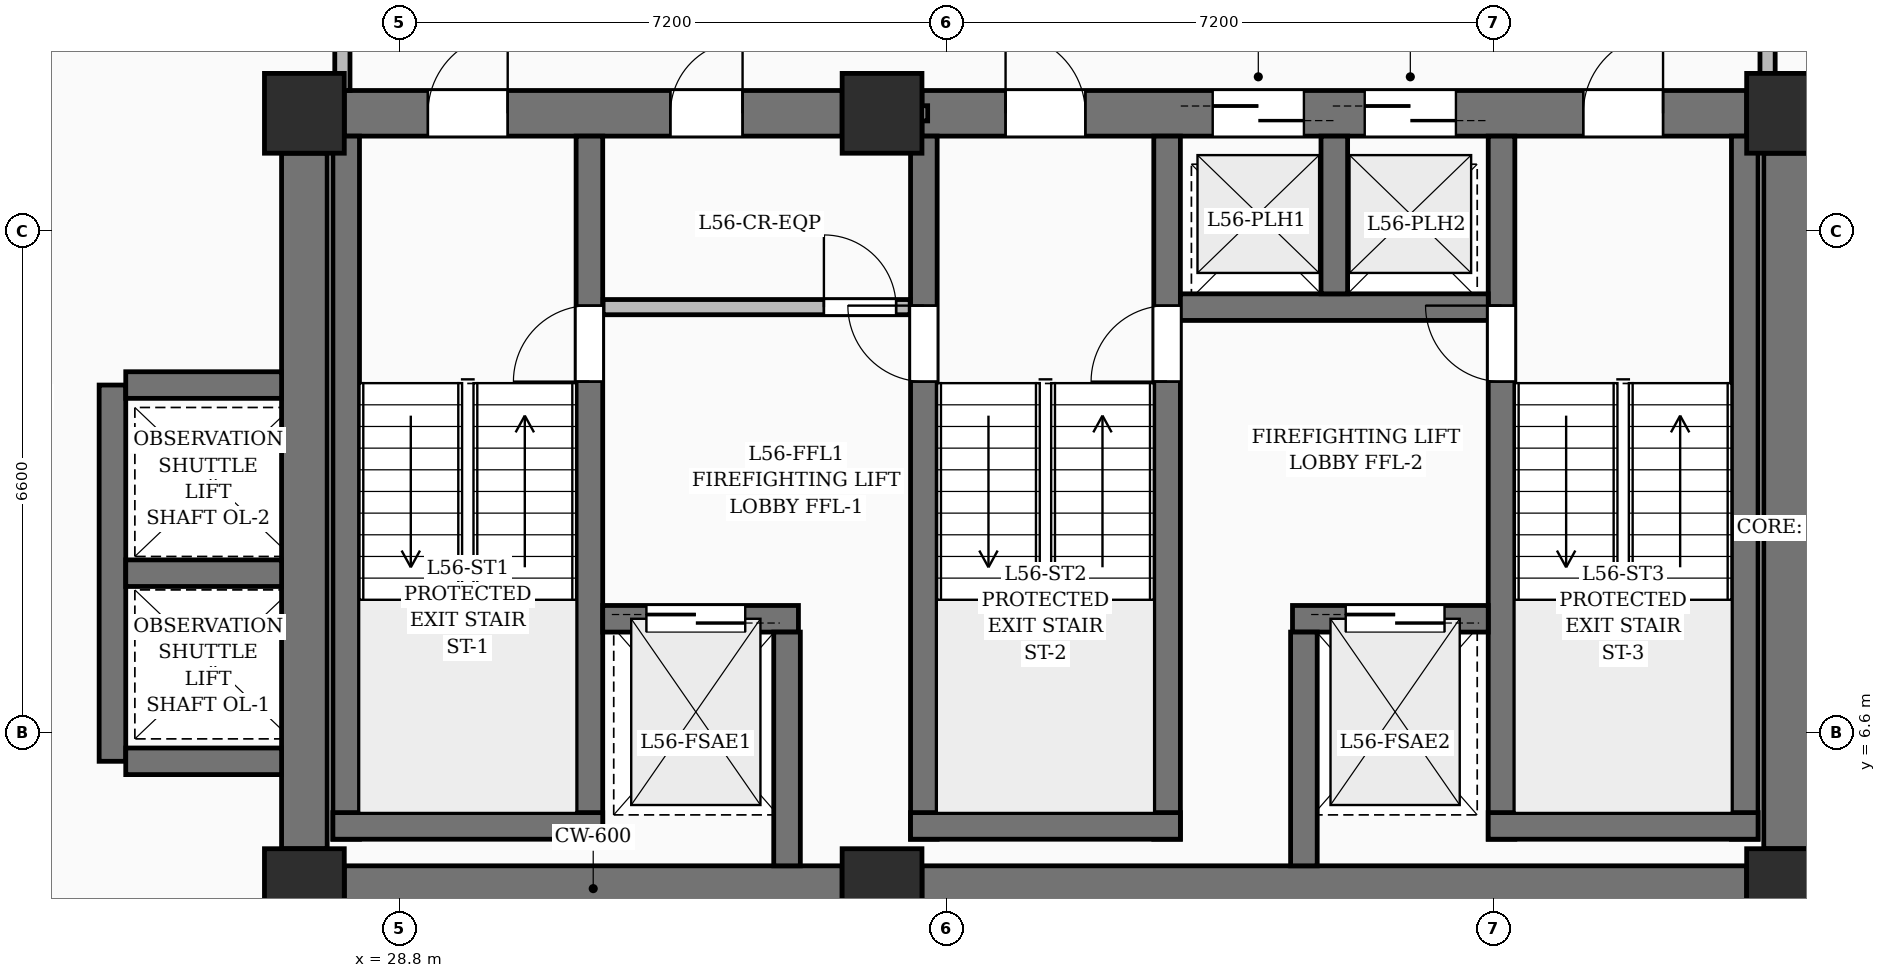
"""IFC4 building model, lengths in metres.
Left out: names, types, materials, properties, quantities, classifications, styles, units other than length and angle.
Written with IfcOpenShell. Run it as: python <this file> out.ifc"""

import sys

from ifc_helpers import new_model, si_unit, direction, frame, frame_2d, origin, origin_2d, place, context, subcontext, project, spatial, rectangle, extrude, element, fill, save


model = new_model("IFC4")
c1 = context("Model", 3, precision=1e-05, world=origin(), true_north=direction((0.0, 1.0)))
c2 = subcontext(c1, "Body", "Model", "MODEL_VIEW")
j1 = project(units=[si_unit("LENGTHUNIT", "METRE"), si_unit("PLANEANGLEUNIT", "RADIAN")], contexts=[c1])
p1 = place(None, origin())
s1 = spatial("IfcSite", under=j1, at=p1, CompositionType="ELEMENT")
p2 = place(p1, origin())
s2 = spatial("IfcBuilding", under=s1, at=p2, CompositionType="ELEMENT")
p3 = place(p2, frame((0.0, 0.0, 218.25)))
s3 = spatial("IfcBuildingStorey", under=s2, at=p3, CompositionType="ELEMENT", Elevation=218.25)
for number, where, z_axis, x_axis in (
    (1, (27.55, 4.55, 0.0), (0.0, 0.0, 1.0), (1.0, 0.0, 0.0)),
    (2, (35.15, 4.55, 0.0), (0.0, 0.0, 1.0), (1.0, 0.0, 0.0)),
    (3, (47.05, 4.55, 0.0), (0.0, 0.0, 1.0), (1.0, 0.0, 0.0)),
    (4, (27.55, 14.75, 0.0), (0.0, 0.0, 1.0), (1.0, 0.0, 0.0)),
    (5, (35.15, 14.75, 0.0), (0.0, 0.0, 1.0), (1.0, 0.0, 0.0)),
    (6, (47.05, 14.75, 0.0), (0.0, 0.0, 1.0), (1.0, 0.0, 0.0)),
):
    element("IfcColumn", number, at=place(p3, frame(where, z_axis=z_axis, x_axis=x_axis)), inside=s3, PredefinedType="COLUMN", context=c2, shape_type="SweptSolid", body=[
        extrude(rectangle(XDim=1.05, YDim=1.05, at=origin_2d()), origin(), (0.0, 0.0, 1.0), 3.75),
    ])
p4 = place(p3, frame((28.075, 4.55, 0.0), z_axis=(0.0, 0.0, 1.0), x_axis=(1.0, 0.0, 0.0)))
e7 = element("IfcWall", 7, at=p4, inside=s3, PredefinedType="SHEAR", context=c2, shape_type="SweptSolid", body=[
    extrude(rectangle(XDim=6.55, YDim=0.6, at=frame_2d((3.275, 0.0))), origin(), (0.0, 0.0, 1.0), 3.75),
])
p5 = place(p3, frame((35.675, 4.55, 0.0), z_axis=(0.0, 0.0, 1.0), x_axis=(1.0, 0.0, 0.0)))
e8 = element("IfcWall", 8, at=p5, inside=s3, PredefinedType="SHEAR", context=c2, shape_type="SweptSolid", body=[
    extrude(rectangle(XDim=10.85, YDim=0.6, at=frame_2d((5.425, 0.0))), origin(), (0.0, 0.0, 1.0), 3.75),
])
p6 = place(p3, frame((28.075, 14.75, 0.0), z_axis=(0.0, 0.0, 1.0), x_axis=(1.0, 0.0, 0.0)))
e9 = element("IfcWall", 9, at=p6, inside=s3, PredefinedType="SHEAR", context=c2, shape_type="SweptSolid", body=[
    extrude(rectangle(XDim=6.55, YDim=0.6, at=frame_2d((3.275, 0.0))), origin(), (0.0, 0.0, 1.0), 3.75),
])
p7 = place(p6, frame((1.1, 0.0, 0.0)))
e10 = element("IfcOpeningElement", 10, at=p7, cuts=e9, PredefinedType="OPENING", context=c2, shape_type="SweptSolid", body=[
    extrude(rectangle(XDim=1.05, YDim=2.15, at=frame_2d((0.525, 1.075))), frame((0.0, 0.31, 0.0), z_axis=(0.0, -1.0, 0.0), x_axis=(1.0, 0.0, 0.0)), (0.0, 0.0, 1.0), 0.62),
])
p8 = place(p6, frame((4.29, 0.0, 0.0)))
e11 = element("IfcOpeningElement", 11, at=p8, cuts=e9, PredefinedType="OPENING", context=c2, shape_type="SweptSolid", body=[
    extrude(rectangle(XDim=0.95, YDim=2.15, at=frame_2d((0.475, 1.075))), frame((0.0, 0.31, 0.0), z_axis=(0.0, -1.0, 0.0), x_axis=(1.0, 0.0, 0.0)), (0.0, 0.0, 1.0), 0.62),
])
p9 = place(p3, frame((35.675, 14.75, 0.0), z_axis=(0.0, 0.0, 1.0), x_axis=(1.0, 0.0, 0.0)))
e12 = element("IfcWall", 12, at=p9, inside=s3, PredefinedType="SHEAR", context=c2, shape_type="SweptSolid", body=[
    extrude(rectangle(XDim=10.85, YDim=0.6, at=frame_2d((5.425, 0.0))), origin(), (0.0, 0.0, 1.0), 3.75),
])
p10 = place(p9, frame((1.1, 0.0, 0.0)))
e13 = element("IfcOpeningElement", 13, at=p10, cuts=e12, PredefinedType="OPENING", context=c2, shape_type="SweptSolid", body=[
    extrude(rectangle(XDim=1.05, YDim=2.15, at=frame_2d((0.525, 1.075))), frame((0.0, 0.31, 0.0), z_axis=(0.0, -1.0, 0.0), x_axis=(1.0, 0.0, 0.0)), (0.0, 0.0, 1.0), 0.62),
])
p11 = place(p9, frame((8.7, 0.0, 0.0)))
e14 = element("IfcOpeningElement", 14, at=p11, cuts=e12, PredefinedType="OPENING", context=c2, shape_type="SweptSolid", body=[
    extrude(rectangle(XDim=1.05, YDim=2.15, at=frame_2d((0.525, 1.075))), frame((0.0, 0.31, 0.0), z_axis=(0.0, -1.0, 0.0), x_axis=(1.0, 0.0, 0.0)), (0.0, 0.0, 1.0), 0.62),
])
p12 = place(p9, frame((3.825, 0.0, 0.0)))
e15 = element("IfcOpeningElement", 15, at=p12, cuts=e12, PredefinedType="OPENING", context=c2, shape_type="SweptSolid", body=[
    extrude(rectangle(XDim=1.2, YDim=2.2, at=frame_2d((0.6, 1.1))), frame((0.0, 0.31, 0.0), z_axis=(0.0, -1.0, 0.0), x_axis=(1.0, 0.0, 0.0)), (0.0, 0.0, 1.0), 0.62),
])
p13 = place(p9, frame((5.825, 0.0, 0.0)))
e16 = element("IfcOpeningElement", 16, at=p13, cuts=e12, PredefinedType="OPENING", context=c2, shape_type="SweptSolid", body=[
    extrude(rectangle(XDim=1.2, YDim=2.2, at=frame_2d((0.6, 1.1))), frame((0.0, 0.31, 0.0), z_axis=(0.0, -1.0, 0.0), x_axis=(1.0, 0.0, 0.0)), (0.0, 0.0, 1.0), 0.62),
])
for number, where, z_axis, x_axis in (
    (17, (27.55, 5.075, 0.0), (0.0, 0.0, 1.0), (0.0, 1.0, 0.0)),
    (18, (47.05, 5.075, 0.0), (0.0, 0.0, 1.0), (0.0, 1.0, 0.0)),
):
    element("IfcWall", number, at=place(p3, frame(where, z_axis=z_axis, x_axis=x_axis)), inside=s3, PredefinedType="SHEAR", context=c2, shape_type="SweptSolid", body=[
        extrude(rectangle(XDim=9.15, YDim=0.6, at=frame_2d((4.575, 0.0))), origin(), (0.0, 0.0, 1.0), 3.75),
    ])
p14 = place(p3, frame((28.1, 5.2, 0.0), z_axis=(0.0, 0.0, 1.0), x_axis=(0.0, 1.0, 0.0)))
e19 = element("IfcWall", 19, at=p14, inside=s3, PredefinedType="SOLIDWALL", context=c2, shape_type="SweptSolid", body=[
    extrude(rectangle(XDim=9.25, YDim=0.35, at=frame_2d((4.625, 0.0))), origin(), (0.0, 0.0, 1.0), 3.75),
])
p15 = place(p3, frame((31.3, 5.2, 0.0), z_axis=(0.0, 0.0, 1.0), x_axis=(0.0, 1.0, 0.0)))
e20 = element("IfcWall", 20, at=p15, inside=s3, PredefinedType="SOLIDWALL", context=c2, shape_type="SweptSolid", body=[
    extrude(rectangle(XDim=9.25, YDim=0.35, at=frame_2d((4.625, 0.0))), origin(), (0.0, 0.0, 1.0), 3.75),
])
p16 = place(p15, frame((6.02, 0.0, 0.0)))
e21 = element("IfcOpeningElement", 21, at=p16, cuts=e20, PredefinedType="OPENING", context=c2, shape_type="SweptSolid", body=[
    extrude(rectangle(XDim=1.0, YDim=2.15, at=frame_2d((0.5, 1.075))), frame((0.0, 0.185, 0.0), z_axis=(0.0, -1.0, 0.0), x_axis=(1.0, 0.0, 0.0)), (0.0, 0.0, 1.0), 0.37),
])
p17 = place(p3, frame((27.925, 5.375, 0.0), z_axis=(0.0, 0.0, 1.0), x_axis=(1.0, 0.0, 0.0)))
e22 = element("IfcWall", 22, at=p17, inside=s3, PredefinedType="SOLIDWALL", context=c2, shape_type="SweptSolid", body=[
    extrude(rectangle(XDim=3.55, YDim=0.35, at=frame_2d((1.775, 0.0))), origin(), (0.0, 0.0, 1.0), 3.75),
])
p18 = place(p3, frame((35.7, 5.2, 0.0), z_axis=(0.0, 0.0, 1.0), x_axis=(0.0, 1.0, 0.0)))
e23 = element("IfcWall", 23, at=p18, inside=s3, PredefinedType="SOLIDWALL", context=c2, shape_type="SweptSolid", body=[
    extrude(rectangle(XDim=9.25, YDim=0.35, at=frame_2d((4.625, 0.0))), origin(), (0.0, 0.0, 1.0), 3.75),
])
p19 = place(p18, frame((6.02, 0.0, 0.0)))
e24 = element("IfcOpeningElement", 24, at=p19, cuts=e23, PredefinedType="OPENING", context=c2, shape_type="SweptSolid", body=[
    extrude(rectangle(XDim=1.0, YDim=2.15, at=frame_2d((0.5, 1.075))), frame((0.0, 0.185, 0.0), z_axis=(0.0, -1.0, 0.0), x_axis=(1.0, 0.0, 0.0)), (0.0, 0.0, 1.0), 0.37),
])
p20 = place(p3, frame((38.9, 5.2, 0.0), z_axis=(0.0, 0.0, 1.0), x_axis=(0.0, 1.0, 0.0)))
e25 = element("IfcWall", 25, at=p20, inside=s3, PredefinedType="SOLIDWALL", context=c2, shape_type="SweptSolid", body=[
    extrude(rectangle(XDim=9.25, YDim=0.35, at=frame_2d((4.625, 0.0))), origin(), (0.0, 0.0, 1.0), 3.75),
])
p21 = place(p20, frame((6.02, 0.0, 0.0)))
e26 = element("IfcOpeningElement", 26, at=p21, cuts=e25, PredefinedType="OPENING", context=c2, shape_type="SweptSolid", body=[
    extrude(rectangle(XDim=1.0, YDim=2.15, at=frame_2d((0.5, 1.075))), frame((0.0, 0.185, 0.0), z_axis=(0.0, -1.0, 0.0), x_axis=(1.0, 0.0, 0.0)), (0.0, 0.0, 1.0), 0.37),
])
p22 = place(p3, frame((35.525, 5.375, 0.0), z_axis=(0.0, 0.0, 1.0), x_axis=(1.0, 0.0, 0.0)))
e27 = element("IfcWall", 27, at=p22, inside=s3, PredefinedType="SOLIDWALL", context=c2, shape_type="SweptSolid", body=[
    extrude(rectangle(XDim=3.55, YDim=0.35, at=frame_2d((1.775, 0.0))), origin(), (0.0, 0.0, 1.0), 3.75),
])
p23 = place(p3, frame((43.3, 5.2, 0.0), z_axis=(0.0, 0.0, 1.0), x_axis=(0.0, 1.0, 0.0)))
e28 = element("IfcWall", 28, at=p23, inside=s3, PredefinedType="SOLIDWALL", context=c2, shape_type="SweptSolid", body=[
    extrude(rectangle(XDim=9.25, YDim=0.35, at=frame_2d((4.625, 0.0))), origin(), (0.0, 0.0, 1.0), 3.75),
])
p24 = place(p23, frame((6.02, 0.0, 0.0)))
e29 = element("IfcOpeningElement", 29, at=p24, cuts=e28, PredefinedType="OPENING", context=c2, shape_type="SweptSolid", body=[
    extrude(rectangle(XDim=1.0, YDim=2.15, at=frame_2d((0.5, 1.075))), frame((0.0, 0.185, 0.0), z_axis=(0.0, -1.0, 0.0), x_axis=(1.0, 0.0, 0.0)), (0.0, 0.0, 1.0), 0.37),
])
p25 = place(p3, frame((46.5, 5.2, 0.0), z_axis=(0.0, 0.0, 1.0), x_axis=(0.0, 1.0, 0.0)))
e30 = element("IfcWall", 30, at=p25, inside=s3, PredefinedType="SOLIDWALL", context=c2, shape_type="SweptSolid", body=[
    extrude(rectangle(XDim=9.25, YDim=0.35, at=frame_2d((4.625, 0.0))), origin(), (0.0, 0.0, 1.0), 3.75),
])
p26 = place(p3, frame((43.125, 5.375, 0.0), z_axis=(0.0, 0.0, 1.0), x_axis=(1.0, 0.0, 0.0)))
e31 = element("IfcWall", 31, at=p26, inside=s3, PredefinedType="SOLIDWALL", context=c2, shape_type="SweptSolid", body=[
    extrude(rectangle(XDim=3.55, YDim=0.35, at=frame_2d((1.775, 0.0))), origin(), (0.0, 0.0, 1.0), 3.75),
])
p27 = place(p3, frame((31.475, 8.1, 0.0), z_axis=(0.0, 0.0, 1.0), x_axis=(1.0, 0.0, 0.0)))
e32 = element("IfcWall", 32, at=p27, inside=s3, PredefinedType="SOLIDWALL", context=c2, shape_type="SweptSolid", body=[
    extrude(rectangle(XDim=2.575, YDim=0.35, at=frame_2d((1.288, 0.0))), origin(), (0.0, 0.0, 1.0), 3.75),
])
p28 = place(p27, frame((0.575, 0.0, 0.0)))
e33 = element("IfcOpeningElement", 33, at=p28, cuts=e32, PredefinedType="OPENING", context=c2, shape_type="SweptSolid", body=[
    extrude(rectangle(XDim=1.3, YDim=2.25, at=frame_2d((0.65, 1.125))), frame((0.0, 0.185, 0.0), z_axis=(0.0, -1.0, 0.0), x_axis=(1.0, 0.0, 0.0)), (0.0, 0.0, 1.0), 0.37),
])
p29 = place(p3, frame((40.55, 8.1, 0.0), z_axis=(0.0, 0.0, 1.0), x_axis=(1.0, 0.0, 0.0)))
e34 = element("IfcWall", 34, at=p29, inside=s3, PredefinedType="SOLIDWALL", context=c2, shape_type="SweptSolid", body=[
    extrude(rectangle(XDim=2.575, YDim=0.35, at=frame_2d((1.288, 0.0))), origin(), (0.0, 0.0, 1.0), 3.75),
])
p30 = place(p29, frame((0.7, 0.0, 0.0)))
e35 = element("IfcOpeningElement", 35, at=p30, cuts=e34, PredefinedType="OPENING", context=c2, shape_type="SweptSolid", body=[
    extrude(rectangle(XDim=1.3, YDim=2.25, at=frame_2d((0.65, 1.125))), frame((0.0, 0.185, 0.0), z_axis=(0.0, -1.0, 0.0), x_axis=(1.0, 0.0, 0.0)), (0.0, 0.0, 1.0), 0.37),
])
for number, where, z_axis, x_axis in (
    (36, (33.9, 4.85, 0.0), (0.0, 0.0, 1.0), (0.0, 1.0, 0.0)),
    (37, (40.7, 4.85, 0.0), (0.0, 0.0, 1.0), (0.0, 1.0, 0.0)),
):
    element("IfcWall", number, at=place(p3, frame(where, z_axis=z_axis, x_axis=x_axis)), inside=s3, PredefinedType="SOLIDWALL", context=c2, shape_type="SweptSolid", body=[
        extrude(rectangle(XDim=3.075, YDim=0.35, at=frame_2d((1.538, 0.0))), origin(), (0.0, 0.0, 1.0), 3.75),
    ])
p31 = place(p3, frame((39.075, 12.2, 0.0), z_axis=(0.0, 0.0, 1.0), x_axis=(1.0, 0.0, 0.0)))
e38 = element("IfcWall", 38, at=p31, inside=s3, PredefinedType="SOLIDWALL", context=c2, shape_type="SweptSolid", body=[
    extrude(rectangle(XDim=4.05, YDim=0.35, at=frame_2d((2.025, 0.0))), origin(), (0.0, 0.0, 1.0), 3.75),
])
p32 = place(p3, frame((41.1, 12.375, 0.0), z_axis=(0.0, 0.0, 1.0), x_axis=(0.0, 1.0, 0.0)))
e39 = element("IfcWall", 39, at=p32, inside=s3, PredefinedType="SOLIDWALL", context=c2, shape_type="SweptSolid", body=[
    extrude(rectangle(XDim=2.075, YDim=0.35, at=frame_2d((1.038, 0.0))), origin(), (0.0, 0.0, 1.0), 3.75),
])
p33 = place(p3, frame((25.025, 6.225, 0.0), z_axis=(0.0, 0.0, 1.0), x_axis=(0.0, 1.0, 0.0)))
e40 = element("IfcWall", 40, at=p33, inside=s3, PredefinedType="SOLIDWALL", context=c2, shape_type="SweptSolid", body=[
    extrude(rectangle(XDim=4.95, YDim=0.35, at=frame_2d((2.475, 0.0))), origin(), (0.0, 0.0, 1.0), 3.75),
])
for number, where, z_axis, x_axis in (
    (41, (25.2, 6.225, 0.0), (0.0, 0.0, 1.0), (1.0, 0.0, 0.0)),
    (42, (25.2, 8.7, 0.0), (0.0, 0.0, 1.0), (1.0, 0.0, 0.0)),
    (43, (25.2, 11.175, 0.0), (0.0, 0.0, 1.0), (1.0, 0.0, 0.0)),
):
    element("IfcWall", number, at=place(p3, frame(where, z_axis=z_axis, x_axis=x_axis)), inside=s3, PredefinedType="SOLIDWALL", context=c2, shape_type="SweptSolid", body=[
        extrude(rectangle(XDim=2.05, YDim=0.35, at=frame_2d((1.025, 0.0))), origin(), (0.0, 0.0, 1.0), 3.75),
    ])
p34 = place(p3, frame((34.72, 14.75, 0.0), z_axis=(0.0, 0.0, 1.0), x_axis=(1.0, 0.0, 0.0)))
e44 = element("IfcWall", 44, at=p34, inside=s3, PredefinedType="PARTITIONING", context=c2, shape_type="SweptSolid", body=[
    extrude(rectangle(XDim=1.03, YDim=0.2, at=frame_2d((0.515, 0.0))), origin(), (0.0, 0.0, 1.0), 2.685),
])
p35 = place(p3, frame((31.48, 12.2, 0.0), z_axis=(0.0, 0.0, 1.0), x_axis=(1.0, 0.0, 0.0)))
e45 = element("IfcWall", 45, at=p35, inside=s3, PredefinedType="PARTITIONING", context=c2, shape_type="SweptSolid", body=[
    extrude(rectangle(XDim=4.04, YDim=0.2, at=frame_2d((2.02, 0.0))), origin(), (0.0, 0.0, 1.0), 3.5),
])
p36 = place(p35, frame((2.905, 0.0, 0.0)))
e46 = element("IfcOpeningElement", 46, at=p36, cuts=e45, PredefinedType="OPENING", context=c2, shape_type="SweptSolid", body=[
    extrude(rectangle(XDim=0.95, YDim=2.15, at=frame_2d((0.475, 1.075))), frame((0.0, 0.11, 0.0), z_axis=(0.0, -1.0, 0.0), x_axis=(1.0, 0.0, 0.0)), (0.0, 0.0, 1.0), 0.22),
])
p37 = place(p3, frame((28.05, 16.665, 0.0), z_axis=(0.0, 0.0, 1.0), x_axis=(0.0, -1.0, 0.0)))
e47 = element("IfcWall", 47, at=p37, inside=s3, PredefinedType="PARTITIONING", context=c2, shape_type="SweptSolid", body=[
    extrude(rectangle(XDim=1.615, YDim=0.2, at=frame_2d((0.808, 0.0))), origin(), (0.0, 0.0, 1.0), 2.862),
])
p38 = place(p3, frame((46.8, 15.05, 0.0), z_axis=(0.0, 0.0, 1.0), x_axis=(0.0, 1.0, 0.0)))
e48 = element("IfcWall", 48, at=p38, inside=s3, PredefinedType="PARTITIONING", context=c2, shape_type="SweptSolid", body=[
    extrude(rectangle(XDim=1.7, YDim=0.2, at=frame_2d((0.85, 0.0))), origin(), (0.0, 0.0, 1.0), 2.685),
])
p39 = place(p7, origin())
e49 = element("IfcDoor", 49, at=p39, inside=s3, OperationType="SINGLE_SWING_RIGHT", PredefinedType="DOOR", context=c2, shape_type="SweptSolid", body=[
    extrude(rectangle(XDim=1.05, YDim=2.15, at=frame_2d((0.525, 1.075))), frame((0.0, 0.025, 0.0), z_axis=(0.0, -1.0, 0.0), x_axis=(1.0, 0.0, 0.0)), (0.0, 0.0, 1.0), 0.05),
])
fill(e10, e49)
p40 = place(p10, origin())
e50 = element("IfcDoor", 50, at=p40, inside=s3, OperationType="SINGLE_SWING_LEFT", PredefinedType="DOOR", context=c2, shape_type="SweptSolid", body=[
    extrude(rectangle(XDim=1.05, YDim=2.15, at=frame_2d((0.525, 1.075))), frame((0.0, 0.025, 0.0), z_axis=(0.0, -1.0, 0.0), x_axis=(1.0, 0.0, 0.0)), (0.0, 0.0, 1.0), 0.05),
])
fill(e13, e50)
p41 = place(p11, origin())
e51 = element("IfcDoor", 51, at=p41, inside=s3, OperationType="SINGLE_SWING_RIGHT", PredefinedType="DOOR", context=c2, shape_type="SweptSolid", body=[
    extrude(rectangle(XDim=1.05, YDim=2.15, at=frame_2d((0.525, 1.075))), frame((0.0, 0.025, 0.0), z_axis=(0.0, -1.0, 0.0), x_axis=(1.0, 0.0, 0.0)), (0.0, 0.0, 1.0), 0.05),
])
fill(e14, e51)
p42 = place(p16, origin())
e52 = element("IfcDoor", 52, at=p42, inside=s3, OperationType="SINGLE_SWING_LEFT", PredefinedType="DOOR", context=c2, shape_type="SweptSolid", body=[
    extrude(rectangle(XDim=1.0, YDim=2.15, at=frame_2d((0.5, 1.075))), frame((0.0, 0.025, 0.0), z_axis=(0.0, -1.0, 0.0), x_axis=(1.0, 0.0, 0.0)), (0.0, 0.0, 1.0), 0.05),
])
fill(e21, e52)
p43 = place(p19, origin())
e53 = element("IfcDoor", 53, at=p43, inside=s3, OperationType="SINGLE_SWING_RIGHT", PredefinedType="DOOR", context=c2, shape_type="SweptSolid", body=[
    extrude(rectangle(XDim=1.0, YDim=2.15, at=frame_2d((0.5, 1.075))), frame((0.0, 0.025, 0.0), z_axis=(0.0, -1.0, 0.0), x_axis=(1.0, 0.0, 0.0)), (0.0, 0.0, 1.0), 0.05),
])
fill(e24, e53)
p44 = place(p21, origin())
e54 = element("IfcDoor", 54, at=p44, inside=s3, OperationType="SINGLE_SWING_LEFT", PredefinedType="DOOR", context=c2, shape_type="SweptSolid", body=[
    extrude(rectangle(XDim=1.0, YDim=2.15, at=frame_2d((0.5, 1.075))), frame((0.0, 0.025, 0.0), z_axis=(0.0, -1.0, 0.0), x_axis=(1.0, 0.0, 0.0)), (0.0, 0.0, 1.0), 0.05),
])
fill(e26, e54)
p45 = place(p24, origin())
e55 = element("IfcDoor", 55, at=p45, inside=s3, OperationType="SINGLE_SWING_RIGHT", PredefinedType="DOOR", context=c2, shape_type="SweptSolid", body=[
    extrude(rectangle(XDim=1.0, YDim=2.15, at=frame_2d((0.5, 1.075))), frame((0.0, 0.025, 0.0), z_axis=(0.0, -1.0, 0.0), x_axis=(1.0, 0.0, 0.0)), (0.0, 0.0, 1.0), 0.05),
])
fill(e29, e55)
p46 = place(p28, origin())
e56 = element("IfcDoor", 56, at=p46, inside=s3, OperationType="DOUBLE_DOOR_SLIDING", PredefinedType="DOOR", context=c2, shape_type="SweptSolid", body=[
    extrude(rectangle(XDim=1.3, YDim=2.25, at=frame_2d((0.65, 1.125))), frame((0.0, 0.025, 0.0), z_axis=(0.0, -1.0, 0.0), x_axis=(1.0, 0.0, 0.0)), (0.0, 0.0, 1.0), 0.05),
])
fill(e33, e56)
p47 = place(p30, origin())
e57 = element("IfcDoor", 57, at=p47, inside=s3, OperationType="DOUBLE_DOOR_SLIDING", PredefinedType="DOOR", context=c2, shape_type="SweptSolid", body=[
    extrude(rectangle(XDim=1.3, YDim=2.25, at=frame_2d((0.65, 1.125))), frame((0.0, 0.025, 0.0), z_axis=(0.0, -1.0, 0.0), x_axis=(1.0, 0.0, 0.0)), (0.0, 0.0, 1.0), 0.05),
])
fill(e35, e57)
p48 = place(p12, origin())
e58 = element("IfcDoor", 58, at=p48, inside=s3, OperationType="DOUBLE_DOOR_SLIDING", PredefinedType="DOOR", context=c2, shape_type="SweptSolid", body=[
    extrude(rectangle(XDim=1.2, YDim=2.2, at=frame_2d((0.6, 1.1))), frame((0.0, 0.025, 0.0), z_axis=(0.0, -1.0, 0.0), x_axis=(1.0, 0.0, 0.0)), (0.0, 0.0, 1.0), 0.05),
])
fill(e15, e58)
p49 = place(p13, origin())
e59 = element("IfcDoor", 59, at=p49, inside=s3, OperationType="DOUBLE_DOOR_SLIDING", PredefinedType="DOOR", context=c2, shape_type="SweptSolid", body=[
    extrude(rectangle(XDim=1.2, YDim=2.2, at=frame_2d((0.6, 1.1))), frame((0.0, 0.025, 0.0), z_axis=(0.0, -1.0, 0.0), x_axis=(1.0, 0.0, 0.0)), (0.0, 0.0, 1.0), 0.05),
])
fill(e16, e59)
p50 = place(p36, origin())
e60 = element("IfcDoor", 60, at=p50, inside=s3, OperationType="SINGLE_SWING_LEFT", PredefinedType="DOOR", context=c2, shape_type="SweptSolid", body=[
    extrude(rectangle(XDim=0.95, YDim=2.15, at=frame_2d((0.475, 1.075))), frame((0.0, 0.025, 0.0), z_axis=(0.0, -1.0, 0.0), x_axis=(1.0, 0.0, 0.0)), (0.0, 0.0, 1.0), 0.05),
])
fill(e46, e60)
p51 = place(p8, origin())
e61 = element("IfcDoor", 61, at=p51, inside=s3, OperationType="SINGLE_SWING_RIGHT", PredefinedType="DOOR", context=c2, shape_type="SweptSolid", body=[
    extrude(rectangle(XDim=0.95, YDim=2.15, at=frame_2d((0.475, 1.075))), frame((0.0, 0.025, 0.0), z_axis=(0.0, -1.0, 0.0), x_axis=(1.0, 0.0, 0.0)), (0.0, 0.0, 1.0), 0.05),
])
fill(e11, e61)
save(model, sys.argv[1])
